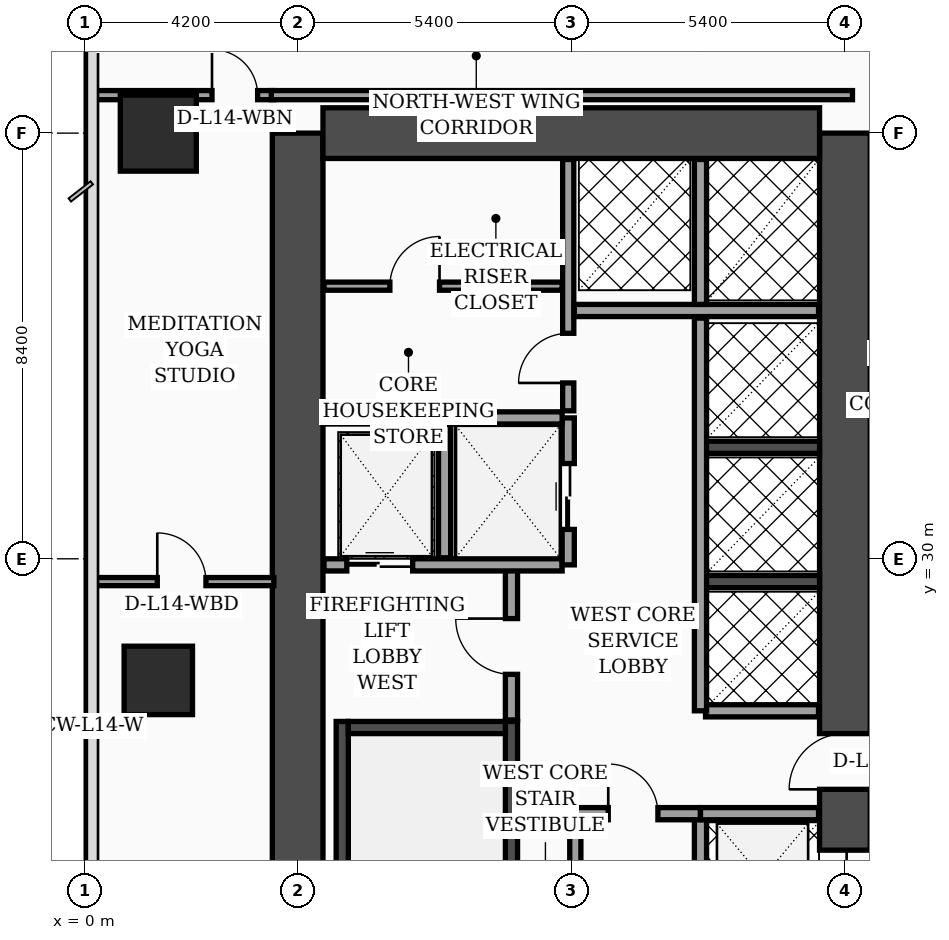
"""IFC4 building model, lengths in metres.
Left out: names, types, materials, properties, quantities, classifications, styles, units other than length and angle.
Written with IfcOpenShell. Run it as: python <this file> out.ifc"""

import sys

from ifc_helpers import new_model, si_unit, direction, frame, frame_2d, origin, origin_2d, place, context, subcontext, project, spatial, rectangle, extrude, element, fill, save


model = new_model("IFC4")
c1 = context("Model", 3, precision=1e-05, world=origin(), true_north=direction((0.0, 1.0)))
c2 = subcontext(c1, "Body", "Model", "MODEL_VIEW")
j1 = project(units=[si_unit("LENGTHUNIT", "METRE"), si_unit("PLANEANGLEUNIT", "RADIAN")], contexts=[c1])
p1 = place(None, origin())
s1 = spatial("IfcSite", under=j1, at=p1, CompositionType="ELEMENT")
p2 = place(p1, origin())
s2 = spatial("IfcBuilding", under=s1, at=p2, CompositionType="ELEMENT")
p3 = place(p2, frame((0.0, 0.0, 62.2)))
s3 = spatial("IfcBuildingStorey", under=s2, at=p3, CompositionType="ELEMENT", Elevation=62.2)
p4 = place(p3, frame((4.2, 16.8, 0.0), z_axis=(0.0, 0.0, 1.0), x_axis=(0.0, 1.0, 0.0)))
e1 = element("IfcWall", 1, at=p4, inside=s3, PredefinedType="SHEAR", context=c2, shape_type="SweptSolid", body=[
    extrude(rectangle(XDim=21.6, YDim=1.0, at=frame_2d((10.8, 0.0))), origin(), (0.0, 0.0, 1.0), 3.56),
])
p5 = place(p3, frame((15.0, 16.8, 0.0), z_axis=(0.0, 0.0, 1.0), x_axis=(0.0, 1.0, 0.0)))
e2 = element("IfcWall", 2, at=p5, inside=s3, PredefinedType="SHEAR", context=c2, shape_type="SweptSolid", body=[
    extrude(rectangle(XDim=21.6, YDim=1.0, at=frame_2d((10.8, 0.0))), origin(), (0.0, 0.0, 1.0), 3.56),
])
p6 = place(p5, frame((8.65, 0.0, 0.0)))
e3 = element("IfcOpeningElement", 3, at=p6, cuts=e2, PredefinedType="OPENING", context=c2, shape_type="SweptSolid", body=[
    extrude(rectangle(XDim=1.1, YDim=2.2, at=frame_2d((0.55, 1.1))), frame((0.0, 0.51, 0.0), z_axis=(0.0, -1.0, 0.0), x_axis=(1.0, 0.0, 0.0)), (0.0, 0.0, 1.0), 1.02),
])
p7 = place(p5, frame((1.25, 0.0, 0.0)))
e4 = element("IfcOpeningElement", 4, at=p7, cuts=e2, PredefinedType="OPENING", context=c2, shape_type="SweptSolid", body=[
    extrude(rectangle(XDim=1.1, YDim=2.2, at=frame_2d((0.55, 1.1))), frame((0.0, 0.51, 0.0), z_axis=(0.0, -1.0, 0.0), x_axis=(1.0, 0.0, 0.0)), (0.0, 0.0, 1.0), 1.02),
])
p8 = place(p5, frame((3.8, 0.0, 0.0)))
e5 = element("IfcOpeningElement", 5, at=p8, cuts=e2, PredefinedType="OPENING", context=c2, shape_type="SweptSolid", body=[
    extrude(rectangle(XDim=1.1, YDim=2.2, at=frame_2d((0.55, 1.1))), frame((0.0, 0.51, 0.0), z_axis=(0.0, -1.0, 0.0), x_axis=(1.0, 0.0, 0.0)), (0.0, 0.0, 1.0), 1.02),
])
p9 = place(p5, frame((6.35, 0.0, 0.0)))
e6 = element("IfcOpeningElement", 6, at=p9, cuts=e2, PredefinedType="OPENING", context=c2, shape_type="SweptSolid", body=[
    extrude(rectangle(XDim=1.1, YDim=2.2, at=frame_2d((0.55, 1.1))), frame((0.0, 0.51, 0.0), z_axis=(0.0, -1.0, 0.0), x_axis=(1.0, 0.0, 0.0)), (0.0, 0.0, 1.0), 1.02),
])
p10 = place(p3, frame((4.7, 38.4, 0.0), z_axis=(0.0, 0.0, 1.0), x_axis=(1.0, 0.0, 0.0)))
e7 = element("IfcWall", 7, at=p10, inside=s3, PredefinedType="SHEAR", context=c2, shape_type="SweptSolid", body=[
    extrude(rectangle(XDim=9.8, YDim=1.0, at=frame_2d((4.9, 0.0))), origin(), (0.0, 0.0, 1.0), 3.56),
])
p11 = place(p3, frame((5.08, 17.3, 0.0), z_axis=(0.0, 0.0, 1.0), x_axis=(0.0, 1.0, 0.0)))
e8 = element("IfcWall", 8, at=p11, inside=s3, PredefinedType="SOLIDWALL", context=c2, shape_type="SweptSolid", body=[
    extrude(rectangle(XDim=9.49, YDim=0.24, at=frame_2d((4.745, 0.0))), origin(), (0.0, 0.0, 1.0), 3.56),
])
p12 = place(p3, frame((8.42, 17.3, 0.0), z_axis=(0.0, 0.0, 1.0), x_axis=(0.0, 1.0, 0.0)))
e9 = element("IfcWall", 9, at=p12, inside=s3, PredefinedType="SOLIDWALL", context=c2, shape_type="SweptSolid", body=[
    extrude(rectangle(XDim=9.49, YDim=0.24, at=frame_2d((4.745, 0.0))), origin(), (0.0, 0.0, 1.0), 3.56),
])
p13 = place(p12, frame((0.35, 0.0, 0.0)))
e10 = element("IfcOpeningElement", 10, at=p13, cuts=e9, PredefinedType="OPENING", context=c2, shape_type="SweptSolid", body=[
    extrude(rectangle(XDim=1.15, YDim=2.2, at=frame_2d((0.575, 1.1))), frame((0.0, 0.13, 0.0), z_axis=(0.0, -1.0, 0.0), x_axis=(1.0, 0.0, 0.0)), (0.0, 0.0, 1.0), 0.26),
])
p14 = place(p3, frame((5.2, 26.67, 0.0), z_axis=(0.0, 0.0, 1.0), x_axis=(1.0, 0.0, 0.0)))
e11 = element("IfcWall", 11, at=p14, inside=s3, PredefinedType="SOLIDWALL", context=c2, shape_type="SweptSolid", body=[
    extrude(rectangle(XDim=3.1, YDim=0.24, at=frame_2d((1.55, 0.0))), origin(), (0.0, 0.0, 1.0), 3.56),
])
for number, where, z_axis, x_axis in (
    (12, (12.18, 29.55, 0.0), (0.0, 0.0, 1.0), (1.0, 0.0, 0.0)),
    (13, (12.18, 32.2, 0.0), (0.0, 0.0, 1.0), (1.0, 0.0, 0.0)),
):
    element("IfcWall", number, at=place(p3, frame(where, z_axis=z_axis, x_axis=x_axis)), inside=s3, PredefinedType="SOLIDWALL", context=c2, shape_type="SweptSolid", body=[
        extrude(rectangle(XDim=2.32, YDim=0.24, at=frame_2d((1.16, 0.0))), origin(), (0.0, 0.0, 1.0), 3.56),
    ])
p15 = place(p3, frame((1.45, 27.6, 0.0), z_axis=(0.0, 0.0, 1.0), x_axis=(1.0, 0.0, 0.0)))
e14 = element("IfcColumn", 14, at=p15, inside=s3, PredefinedType="COLUMN", context=c2, shape_type="SweptSolid", body=[
    extrude(rectangle(XDim=1.35, YDim=1.35, at=origin_2d()), origin(), (0.0, 0.0, 1.0), 3.56),
])
p16 = place(p3, frame((1.45, 38.4, 0.0), z_axis=(0.0, 0.0, 1.0), x_axis=(1.0, 0.0, 0.0)))
e15 = element("IfcColumn", 15, at=p16, inside=s3, PredefinedType="COLUMN", context=c2, shape_type="SweptSolid", body=[
    extrude(rectangle(XDim=1.5, YDim=1.5, at=origin_2d()), origin(), (0.0, 0.0, 1.0), 3.56),
])
p17 = place(p3, frame((8.42, 26.82, 0.0), z_axis=(0.0, 0.0, 1.0), x_axis=(0.0, 1.0, 0.0)))
e16 = element("IfcWall", 16, at=p17, inside=s3, PredefinedType="SOLIDWALL", context=c2, shape_type="SweptSolid", body=[
    extrude(rectangle(XDim=3.0, YDim=0.24, at=frame_2d((1.5, 0.0))), origin(), (0.0, 0.0, 1.0), 3.56),
])
p18 = place(p17, frame((0.9, 0.0, 0.0)))
e17 = element("IfcOpeningElement", 17, at=p18, cuts=e16, PredefinedType="OPENING", context=c2, shape_type="SweptSolid", body=[
    extrude(rectangle(XDim=1.1, YDim=2.2, at=frame_2d((0.55, 1.1))), frame((0.0, 0.13, 0.0), z_axis=(0.0, -1.0, 0.0), x_axis=(1.0, 0.0, 0.0)), (0.0, 0.0, 1.0), 0.26),
])
p19 = place(p3, frame((4.72, 29.88, 0.0), z_axis=(0.0, 0.0, 1.0), x_axis=(1.0, 0.0, 0.0)))
e18 = element("IfcWall", 18, at=p19, inside=s3, PredefinedType="SOLIDWALL", context=c2, shape_type="SweptSolid", body=[
    extrude(rectangle(XDim=4.7, YDim=0.24, at=frame_2d((2.35, 0.0))), origin(), (0.0, 0.0, 1.0), 3.56),
])
p20 = place(p19, frame((0.45, 0.0, 0.0)))
e19 = element("IfcOpeningElement", 19, at=p20, cuts=e18, PredefinedType="OPENING", context=c2, shape_type="SweptSolid", body=[
    extrude(rectangle(XDim=1.3, YDim=2.35, at=frame_2d((0.65, 1.175))), frame((0.0, 0.13, 0.0), z_axis=(0.0, -1.0, 0.0), x_axis=(1.0, 0.0, 0.0)), (0.0, 0.0, 1.0), 0.26),
])
p21 = place(p3, frame((7.1, 30.02, 0.0), z_axis=(0.0, 0.0, 1.0), x_axis=(0.0, 1.0, 0.0)))
e20 = element("IfcWall", 20, at=p21, inside=s3, PredefinedType="SOLIDWALL", context=c2, shape_type="SweptSolid", body=[
    extrude(rectangle(XDim=2.63, YDim=0.24, at=frame_2d((1.315, 0.0))), origin(), (0.0, 0.0, 1.0), 3.56),
])
p22 = place(p3, frame((9.54, 29.88, 0.0), z_axis=(0.0, 0.0, 1.0), x_axis=(0.0, 1.0, 0.0)))
e21 = element("IfcWall", 21, at=p22, inside=s3, PredefinedType="SOLIDWALL", context=c2, shape_type="SweptSolid", body=[
    extrude(rectangle(XDim=2.9, YDim=0.24, at=frame_2d((1.45, 0.0))), origin(), (0.0, 0.0, 1.0), 3.56),
])
p23 = place(p22, frame((0.7, 0.0, 0.0)))
e22 = element("IfcOpeningElement", 22, at=p23, cuts=e21, PredefinedType="OPENING", context=c2, shape_type="SweptSolid", body=[
    extrude(rectangle(XDim=1.3, YDim=2.35, at=frame_2d((0.65, 1.175))), frame((0.0, 0.13, 0.0), z_axis=(0.0, -1.0, 0.0), x_axis=(1.0, 0.0, 0.0)), (0.0, 0.0, 1.0), 0.26),
])
p24 = place(p3, frame((4.72, 32.78, 0.0), z_axis=(0.0, 0.0, 1.0), x_axis=(1.0, 0.0, 0.0)))
e23 = element("IfcWall", 23, at=p24, inside=s3, PredefinedType="SOLIDWALL", context=c2, shape_type="SweptSolid", body=[
    extrude(rectangle(XDim=4.7, YDim=0.24, at=frame_2d((2.35, 0.0))), origin(), (0.0, 0.0, 1.0), 3.56),
])
p25 = place(p3, frame((9.68, 17.32, 0.0), z_axis=(0.0, 0.0, 1.0), x_axis=(0.0, 1.0, 0.0)))
e24 = element("IfcWall", 24, at=p25, inside=s3, PredefinedType="SOLIDWALL", context=c2, shape_type="SweptSolid", body=[
    extrude(rectangle(XDim=7.68, YDim=0.22, at=frame_2d((3.84, 0.0))), origin(), (0.0, 0.0, 1.0), 3.56),
])
p26 = place(p3, frame((4.72, 35.38, 0.0), z_axis=(0.0, 0.0, 1.0), x_axis=(1.0, 0.0, 0.0)))
e25 = element("IfcWall", 25, at=p26, inside=s3, PredefinedType="PARTITIONING", context=c2, shape_type="SweptSolid", body=[
    extrude(rectangle(XDim=4.7, YDim=0.16, at=frame_2d((2.35, 0.0))), origin(), (0.0, 0.0, 1.0), 3.56),
])
p27 = place(p26, frame((1.3, 0.0, 0.0)))
e26 = element("IfcOpeningElement", 26, at=p27, cuts=e25, PredefinedType="OPENING", context=c2, shape_type="SweptSolid", body=[
    extrude(rectangle(XDim=0.98, YDim=2.15, at=frame_2d((0.49, 1.075))), frame((0.0, 0.09, 0.0), z_axis=(0.0, -1.0, 0.0), x_axis=(1.0, 0.0, 0.0)), (0.0, 0.0, 1.0), 0.18),
])
p28 = place(p3, frame((9.54, 32.92, 0.0), z_axis=(0.0, 0.0, 1.0), x_axis=(0.0, 1.0, 0.0)))
e27 = element("IfcWall", 27, at=p28, inside=s3, PredefinedType="SOLIDWALL", context=c2, shape_type="SweptSolid", body=[
    extrude(rectangle(XDim=4.96, YDim=0.22, at=frame_2d((2.48, 0.0))), origin(), (0.0, 0.0, 1.0), 3.56),
])
p29 = place(p28, frame((0.55, 0.0, 0.0)))
e28 = element("IfcOpeningElement", 28, at=p29, cuts=e27, PredefinedType="OPENING", context=c2, shape_type="SweptSolid", body=[
    extrude(rectangle(XDim=0.98, YDim=2.15, at=frame_2d((0.49, 1.075))), frame((0.0, 0.12, 0.0), z_axis=(0.0, -1.0, 0.0), x_axis=(1.0, 0.0, 0.0)), (0.0, 0.0, 1.0), 0.24),
])
p30 = place(p3, frame((12.15, 17.32, 0.0), z_axis=(0.0, 0.0, 1.0), x_axis=(0.0, 1.0, 0.0)))
e29 = element("IfcWall", 29, at=p30, inside=s3, PredefinedType="SOLIDWALL", context=c2, shape_type="SweptSolid", body=[
    extrude(rectangle(XDim=7.65, YDim=0.24, at=frame_2d((3.825, 0.0))), origin(), (0.0, 0.0, 1.0), 3.56),
])
p31 = place(p3, frame((9.68, 24.97, 0.0), z_axis=(0.0, 0.0, 1.0), x_axis=(1.0, 0.0, 0.0)))
e30 = element("IfcWall", 30, at=p31, inside=s3, PredefinedType="SOLIDWALL", context=c2, shape_type="SweptSolid", body=[
    extrude(rectangle(XDim=2.47, YDim=0.24, at=frame_2d((1.235, 0.0))), origin(), (0.0, 0.0, 1.0), 3.56),
])
p32 = place(p31, frame((0.65, 0.0, 0.0)))
e31 = element("IfcOpeningElement", 31, at=p32, cuts=e30, PredefinedType="OPENING", context=c2, shape_type="SweptSolid", body=[
    extrude(rectangle(XDim=0.98, YDim=2.15, at=frame_2d((0.49, 1.075))), frame((0.0, 0.13, 0.0), z_axis=(0.0, -1.0, 0.0), x_axis=(1.0, 0.0, 0.0)), (0.0, 0.0, 1.0), 0.26),
])
p33 = place(p3, frame((12.15, 24.97, 0.0), z_axis=(0.0, 0.0, 1.0), x_axis=(1.0, 0.0, 0.0)))
e32 = element("IfcWall", 32, at=p33, inside=s3, PredefinedType="SOLIDWALL", context=c2, shape_type="SweptSolid", body=[
    extrude(rectangle(XDim=2.33, YDim=0.24, at=frame_2d((1.165, 0.0))), origin(), (0.0, 0.0, 1.0), 2.84),
])
p34 = place(p3, frame((12.25, 27.0, 0.0), z_axis=(0.0, 0.0, 1.0), x_axis=(1.0, 0.0, 0.0)))
e33 = element("IfcWall", 33, at=p34, inside=s3, PredefinedType="SOLIDWALL", context=c2, shape_type="SweptSolid", body=[
    extrude(rectangle(XDim=2.23, YDim=0.24, at=frame_2d((1.115, 0.0))), origin(), (0.0, 0.0, 1.0), 3.56),
])
p35 = place(p3, frame((12.15, 27.0, 0.0), z_axis=(0.0, 0.0, 1.0), x_axis=(0.0, 1.0, 0.0)))
e34 = element("IfcWall", 34, at=p35, inside=s3, PredefinedType="SOLIDWALL", context=c2, shape_type="SweptSolid", body=[
    extrude(rectangle(XDim=7.75, YDim=0.24, at=frame_2d((3.875, 0.0))), origin(), (0.0, 0.0, 1.0), 3.56),
])
p36 = place(p3, frame((9.66, 34.9, 0.0), z_axis=(0.0, 0.0, 1.0), x_axis=(1.0, 0.0, 0.0)))
e35 = element("IfcWall", 35, at=p36, inside=s3, PredefinedType="SOLIDWALL", context=c2, shape_type="SweptSolid", body=[
    extrude(rectangle(XDim=4.82, YDim=0.24, at=frame_2d((2.41, 0.0))), origin(), (0.0, 0.0, 1.0), 3.56),
])
p37 = place(p3, frame((12.15, 35.02, 0.0), z_axis=(0.0, 0.0, 1.0), x_axis=(0.0, 1.0, 0.0)))
e36 = element("IfcWall", 36, at=p37, inside=s3, PredefinedType="SOLIDWALL", context=c2, shape_type="SweptSolid", body=[
    extrude(rectangle(XDim=2.86, YDim=0.24, at=frame_2d((1.43, 0.0))), origin(), (0.0, 0.0, 1.0), 3.56),
])
p38 = place(p3, frame((0.08, 29.55, 0.0), z_axis=(0.0, 0.0, 1.0), x_axis=(1.0, 0.0, 0.0)))
e37 = element("IfcWall", 37, at=p38, inside=s3, PredefinedType="PARTITIONING", context=c2, shape_type="SweptSolid", body=[
    extrude(rectangle(XDim=3.65, YDim=0.16, at=frame_2d((1.825, 0.0))), origin(), (0.0, 0.0, 1.0), 3.04),
])
p39 = place(p38, frame((1.35, 0.0, 0.0)))
e38 = element("IfcOpeningElement", 38, at=p39, cuts=e37, PredefinedType="OPENING", context=c2, shape_type="SweptSolid", body=[
    extrude(rectangle(XDim=0.96, YDim=2.2, at=frame_2d((0.48, 1.1))), frame((0.0, 0.09, 0.0), z_axis=(0.0, -1.0, 0.0), x_axis=(1.0, 0.0, 0.0)), (0.0, 0.0, 1.0), 0.18),
])
p40 = place(p3, frame((0.08, 39.15, 0.0), z_axis=(0.0, 0.0, 1.0), x_axis=(1.0, 0.0, 0.0)))
e39 = element("IfcWall", 39, at=p40, inside=s3, PredefinedType="PARTITIONING", context=c2, shape_type="SweptSolid", body=[
    extrude(rectangle(XDim=3.65, YDim=0.18, at=frame_2d((1.825, 0.0))), origin(), (0.0, 0.0, 1.0), 2.84),
])
p41 = place(p40, frame((2.43, 0.0, 0.0)))
e40 = element("IfcOpeningElement", 40, at=p41, cuts=e39, PredefinedType="OPENING", context=c2, shape_type="SweptSolid", body=[
    extrude(rectangle(XDim=0.9, YDim=2.15, at=frame_2d((0.45, 1.075))), frame((0.0, 0.1, 0.0), z_axis=(0.0, -1.0, 0.0), x_axis=(1.0, 0.0, 0.0)), (0.0, 0.0, 1.0), 0.2),
])
p42 = place(p3, frame((3.68, 39.15, 0.0), z_axis=(0.0, 0.0, 1.0), x_axis=(1.0, 0.0, 0.0)))
e41 = element("IfcWall", 41, at=p42, inside=s3, PredefinedType="PARTITIONING", context=c2, shape_type="SweptSolid", body=[
    extrude(rectangle(XDim=11.47, YDim=0.18, at=frame_2d((5.735, 0.0))), origin(), (0.0, 0.0, 1.0), 2.84),
])
p43 = place(p18, origin())
e42 = element("IfcDoor", 42, at=p43, inside=s3, OperationType="SINGLE_SWING_RIGHT", PredefinedType="DOOR", context=c2, shape_type="SweptSolid", body=[
    extrude(rectangle(XDim=1.1, YDim=2.2, at=frame_2d((0.55, 1.1))), frame((0.0, 0.025, 0.0), z_axis=(0.0, -1.0, 0.0), x_axis=(1.0, 0.0, 0.0)), (0.0, 0.0, 1.0), 0.05),
])
fill(e17, e42)
p44 = place(p20, origin())
e43 = element("IfcDoor", 43, at=p44, inside=s3, OperationType="DOUBLE_DOOR_SLIDING", PredefinedType="DOOR", context=c2, shape_type="SweptSolid", body=[
    extrude(rectangle(XDim=1.3, YDim=2.35, at=frame_2d((0.65, 1.175))), frame((0.0, 0.025, 0.0), z_axis=(0.0, -1.0, 0.0), x_axis=(1.0, 0.0, 0.0)), (0.0, 0.0, 1.0), 0.05),
])
fill(e19, e43)
p45 = place(p23, origin())
e44 = element("IfcDoor", 44, at=p45, inside=s3, OperationType="DOUBLE_DOOR_SLIDING", PredefinedType="DOOR", context=c2, shape_type="SweptSolid", body=[
    extrude(rectangle(XDim=1.3, YDim=2.35, at=frame_2d((0.65, 1.175))), frame((0.0, 0.025, 0.0), z_axis=(0.0, -1.0, 0.0), x_axis=(1.0, 0.0, 0.0)), (0.0, 0.0, 1.0), 0.05),
])
fill(e22, e44)
p46 = place(p27, origin())
e45 = element("IfcDoor", 45, at=p46, inside=s3, OperationType="SINGLE_SWING_RIGHT", PredefinedType="DOOR", context=c2, shape_type="SweptSolid", body=[
    extrude(rectangle(XDim=0.98, YDim=2.15, at=frame_2d((0.49, 1.075))), frame((0.0, 0.025, 0.0), z_axis=(0.0, -1.0, 0.0), x_axis=(1.0, 0.0, 0.0)), (0.0, 0.0, 1.0), 0.05),
])
fill(e26, e45)
p47 = place(p29, origin())
e46 = element("IfcDoor", 46, at=p47, inside=s3, OperationType="SINGLE_SWING_LEFT", PredefinedType="DOOR", context=c2, shape_type="SweptSolid", body=[
    extrude(rectangle(XDim=0.98, YDim=2.15, at=frame_2d((0.49, 1.075))), frame((0.0, 0.025, 0.0), z_axis=(0.0, -1.0, 0.0), x_axis=(1.0, 0.0, 0.0)), (0.0, 0.0, 1.0), 0.05),
])
fill(e28, e46)
p48 = place(p32, origin())
e47 = element("IfcDoor", 47, at=p48, inside=s3, OperationType="SINGLE_SWING_LEFT", PredefinedType="DOOR", context=c2, shape_type="SweptSolid", body=[
    extrude(rectangle(XDim=0.98, YDim=2.15, at=frame_2d((0.49, 1.075))), frame((0.0, 0.025, 0.0), z_axis=(0.0, -1.0, 0.0), x_axis=(1.0, 0.0, 0.0)), (0.0, 0.0, 1.0), 0.05),
])
fill(e31, e47)
p49 = place(p39, origin())
e48 = element("IfcDoor", 48, at=p49, inside=s3, OperationType="SINGLE_SWING_LEFT", PredefinedType="DOOR", context=c2, shape_type="SweptSolid", body=[
    extrude(rectangle(XDim=0.96, YDim=2.2, at=frame_2d((0.48, 1.1))), frame((0.0, 0.025, 0.0), z_axis=(0.0, -1.0, 0.0), x_axis=(1.0, 0.0, 0.0)), (0.0, 0.0, 1.0), 0.05),
])
fill(e38, e48)
p50 = place(p41, origin())
e49 = element("IfcDoor", 49, at=p50, inside=s3, OperationType="SINGLE_SWING_LEFT", PredefinedType="DOOR", context=c2, shape_type="SweptSolid", body=[
    extrude(rectangle(XDim=0.9, YDim=2.15, at=frame_2d((0.45, 1.075))), frame((0.0, 0.025, 0.0), z_axis=(0.0, -1.0, 0.0), x_axis=(1.0, 0.0, 0.0)), (0.0, 0.0, 1.0), 0.05),
])
fill(e40, e49)
p51 = place(p6, origin())
e50 = element("IfcDoor", 50, at=p51, inside=s3, OperationType="SINGLE_SWING_LEFT", PredefinedType="DOOR", context=c2, shape_type="SweptSolid", body=[
    extrude(rectangle(XDim=1.1, YDim=2.2, at=frame_2d((0.55, 1.1))), frame((0.0, 0.025, 0.0), z_axis=(0.0, -1.0, 0.0), x_axis=(1.0, 0.0, 0.0)), (0.0, 0.0, 1.0), 0.05),
])
fill(e3, e50)
p52 = place(p9, origin())
e51 = element("IfcDoor", 51, at=p52, inside=s3, OperationType="DOUBLE_DOOR_SLIDING", PredefinedType="DOOR", context=c2, shape_type="SweptSolid", body=[
    extrude(rectangle(XDim=1.1, YDim=2.2, at=frame_2d((0.55, 1.1))), frame((0.0, 0.025, 0.0), z_axis=(0.0, -1.0, 0.0), x_axis=(1.0, 0.0, 0.0)), (0.0, 0.0, 1.0), 0.05),
])
fill(e6, e51)
save(model, sys.argv[1])
